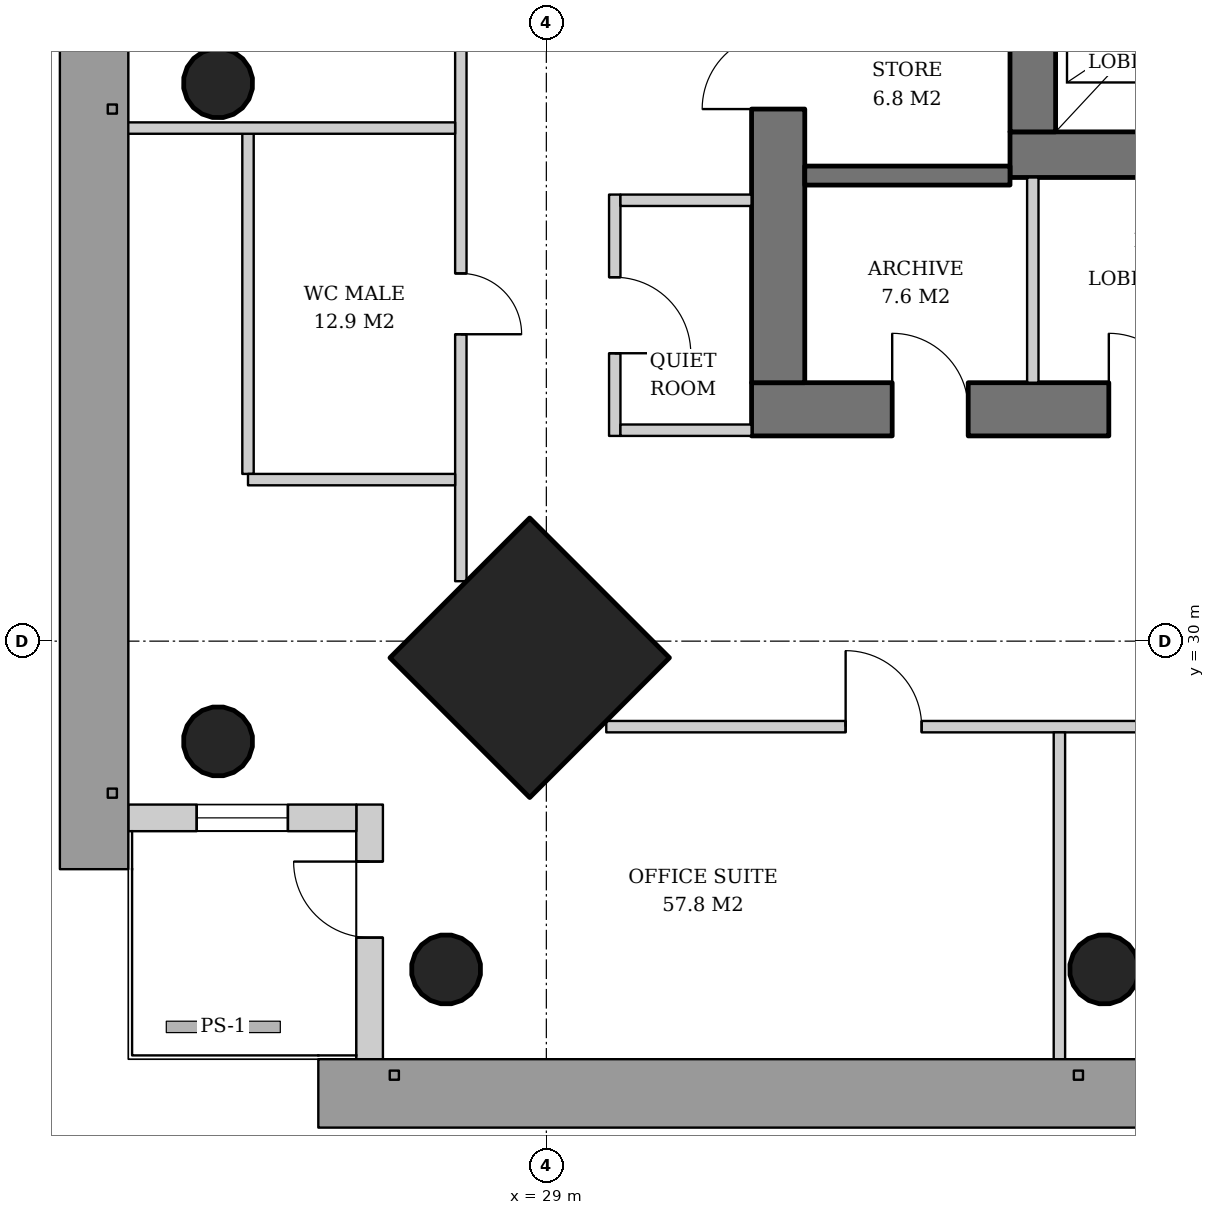
"""IFC4 building model, lengths in metres.
Left out: names, types, materials, properties, quantities, classifications, styles, units other than length and angle.
Written with IfcOpenShell. Run it as: python <this file> out.ifc"""

import sys

from ifc_helpers import new_model, si_unit, direction, frame, frame_2d, origin, origin_2d, place, context, subcontext, project, spatial, rectangle, hollow_circle, extrude, element, fill, save


model = new_model("IFC4")
c1 = context("Model", 3, precision=1e-05, world=origin(), true_north=direction((0.0, 1.0)))
c2 = subcontext(c1, "Body", "Model", "MODEL_VIEW")
j1 = project(units=[si_unit("LENGTHUNIT", "METRE"), si_unit("PLANEANGLEUNIT", "RADIAN")], contexts=[c1])
p1 = place(None, origin())
s1 = spatial("IfcSite", under=j1, at=p1, CompositionType="ELEMENT")
p2 = place(p1, origin())
s2 = spatial("IfcBuilding", under=s1, at=p2, CompositionType="ELEMENT")
p3 = place(p2, frame((0.0, 0.0, 135.0)))
s3 = spatial("IfcBuildingStorey", under=s2, at=p3, CompositionType="ELEMENT", Elevation=135.0)
p4 = place(p3, frame((28.743, 29.743, 0.0), z_axis=(0.031898107953, 0.031898107953, 0.998981992539), x_axis=(-0.707106781187, 0.707106781187, 0.0)))
e1 = element("IfcColumn", 1, at=p4, inside=s3, PredefinedType="COLUMN", context=c2, shape_type="SweptSolid", body=[
    extrude(rectangle(XDim=2.6, YDim=2.6, at=origin_2d()), origin(), (0.0, 0.0, 1.0), 3.804),
])
p5 = place(p3, frame((24.643, 28.643, 0.0), z_axis=(0.031962158256, 0.031962158256, 0.998977898093), x_axis=(-0.707106781187, 0.707106781187, 0.0)))
e2 = element("IfcColumn", 2, at=p5, inside=s3, PredefinedType="COLUMN", context=c2, shape_type="SweptSolid", body=[
    extrude(hollow_circle(Radius=0.457, WallThickness=0.03, at=origin_2d()), origin(), (0.0, 0.0, 1.0), 3.804),
])
p6 = place(p3, frame((24.643, 37.322, 0.0), z_axis=(0.031974442509, 0.015923015547, 0.999361842679), x_axis=(-0.445775033553, 0.895145027055, 0.0)))
e3 = element("IfcColumn", 3, at=p6, inside=s3, PredefinedType="COLUMN", context=c2, shape_type="SweptSolid", body=[
    extrude(hollow_circle(Radius=0.457, WallThickness=0.03, at=origin_2d()), origin(), (0.0, 0.0, 1.0), 3.802),
])
p7 = place(p3, frame((27.643, 25.643, 0.0), z_axis=(0.031962158256, 0.031962158256, 0.998977898093), x_axis=(-0.707106781187, 0.707106781187, 0.0)))
e4 = element("IfcColumn", 4, at=p7, inside=s3, PredefinedType="COLUMN", context=c2, shape_type="SweptSolid", body=[
    extrude(hollow_circle(Radius=0.457, WallThickness=0.03, at=origin_2d()), origin(), (0.0, 0.0, 1.0), 3.804),
])
p8 = place(p3, frame((36.322, 25.643, 0.0), z_axis=(0.015923015547, 0.031974442509, 0.999361842679), x_axis=(-0.895145027055, 0.445775033553, 0.0)))
e5 = element("IfcColumn", 5, at=p8, inside=s3, PredefinedType="COLUMN", context=c2, shape_type="SweptSolid", body=[
    extrude(hollow_circle(Radius=0.457, WallThickness=0.03, at=origin_2d()), origin(), (0.0, 0.0, 1.0), 3.802),
])
p9 = place(p3, frame((35.1, 36.4, 0.0), z_axis=(0.0, 0.0, 1.0), x_axis=(1.0, 0.0, 0.0)))
e6 = element("IfcWall", 6, at=p9, inside=s3, PredefinedType="SHEAR", context=c2, shape_type="SweptSolid", body=[
    extrude(rectangle(XDim=19.8, YDim=0.6, at=frame_2d((9.9, 0.0))), origin(), (0.0, 0.0, 1.0), 3.8),
])
p10 = place(p9, frame((3.9, 0.0, 0.0)))
e7 = element("IfcOpeningElement", 7, at=p10, cuts=e6, PredefinedType="OPENING", context=c2, shape_type="SweptSolid", body=[
    extrude(rectangle(XDim=1.0, YDim=2.1, at=frame_2d((0.5, 1.05))), frame((0.0, 0.31, 0.0), z_axis=(0.0, -1.0, 0.0), x_axis=(1.0, 0.0, 0.0)), (0.0, 0.0, 1.0), 0.62),
])
p11 = place(p9, frame((15.35, 0.0, 0.0)))
e8 = element("IfcOpeningElement", 8, at=p11, cuts=e6, PredefinedType="OPENING", context=c2, shape_type="SweptSolid", body=[
    extrude(rectangle(XDim=1.0, YDim=2.1, at=frame_2d((0.5, 1.05))), frame((0.0, 0.31, 0.0), z_axis=(0.0, -1.0, 0.0), x_axis=(1.0, 0.0, 0.0)), (0.0, 0.0, 1.0), 0.62),
])
p12 = place(p3, frame((35.4, 36.7, 0.0), z_axis=(0.0, 0.0, 1.0), x_axis=(0.0, 1.0, 0.0)))
e9 = element("IfcWall", 9, at=p12, inside=s3, PredefinedType="SHEAR", context=c2, shape_type="SweptSolid", body=[
    extrude(rectangle(XDim=18.6, YDim=0.6, at=frame_2d((9.3, 0.0))), origin(), (0.0, 0.0, 1.0), 3.8),
])
p13 = place(p12, frame((8.4, 0.0, 0.0)))
e10 = element("IfcOpeningElement", 10, at=p13, cuts=e9, PredefinedType="OPENING", context=c2, shape_type="SweptSolid", body=[
    extrude(rectangle(XDim=1.8, YDim=2.4, at=frame_2d((0.9, 1.2))), frame((0.0, 0.31, 0.0), z_axis=(0.0, -1.0, 0.0), x_axis=(1.0, 0.0, 0.0)), (0.0, 0.0, 1.0), 0.62),
])
p14 = place(p3, frame((31.7, 33.05, 0.0), z_axis=(0.0, 0.0, 1.0), x_axis=(1.0, 0.0, 0.0)))
e11 = element("IfcWall", 11, at=p14, inside=s3, PredefinedType="SHEAR", context=c2, shape_type="SweptSolid", body=[
    extrude(rectangle(XDim=26.6, YDim=0.7, at=frame_2d((13.3, 0.0))), origin(), (0.0, 0.0, 1.0), 3.8),
])
p15 = place(p14, frame((7.3, 0.0, 0.0)))
e12 = element("IfcOpeningElement", 12, at=p15, cuts=e11, PredefinedType="OPENING", context=c2, shape_type="SweptSolid", body=[
    extrude(rectangle(XDim=1.0, YDim=2.1, at=frame_2d((0.5, 1.05))), frame((0.0, 0.36, 0.0), z_axis=(0.0, -1.0, 0.0), x_axis=(1.0, 0.0, 0.0)), (0.0, 0.0, 1.0), 0.72),
])
p16 = place(p14, frame((18.75, 0.0, 0.0)))
e13 = element("IfcOpeningElement", 13, at=p16, cuts=e11, PredefinedType="OPENING", context=c2, shape_type="SweptSolid", body=[
    extrude(rectangle(XDim=1.0, YDim=2.1, at=frame_2d((0.5, 1.05))), frame((0.0, 0.36, 0.0), z_axis=(0.0, -1.0, 0.0), x_axis=(1.0, 0.0, 0.0)), (0.0, 0.0, 1.0), 0.72),
])
p17 = place(p14, frame((1.85, 0.0, 0.0)))
e14 = element("IfcOpeningElement", 14, at=p17, cuts=e11, PredefinedType="OPENING", context=c2, shape_type="SweptSolid", body=[
    extrude(rectangle(XDim=1.0, YDim=2.1, at=frame_2d((0.5, 1.05))), frame((0.0, 0.36, 0.0), z_axis=(0.0, -1.0, 0.0), x_axis=(1.0, 0.0, 0.0)), (0.0, 0.0, 1.0), 0.72),
])
p18 = place(p14, frame((4.7, 0.0, 0.0)))
e15 = element("IfcOpeningElement", 15, at=p18, cuts=e11, PredefinedType="OPENING", context=c2, shape_type="SweptSolid", body=[
    extrude(rectangle(XDim=1.0, YDim=2.1, at=frame_2d((0.5, 1.05))), frame((0.0, 0.36, 0.0), z_axis=(0.0, -1.0, 0.0), x_axis=(1.0, 0.0, 0.0)), (0.0, 0.0, 1.0), 0.72),
])
p19 = place(p14, frame((12.44, 0.0, 0.0)))
e16 = element("IfcOpeningElement", 16, at=p19, cuts=e11, PredefinedType="OPENING", context=c2, shape_type="SweptSolid", body=[
    extrude(rectangle(XDim=1.0, YDim=2.1, at=frame_2d((0.5, 1.05))), frame((0.0, 0.36, 0.0), z_axis=(0.0, -1.0, 0.0), x_axis=(1.0, 0.0, 0.0)), (0.0, 0.0, 1.0), 0.72),
])
p20 = place(p14, frame((20.644, 0.0, 0.0)))
e17 = element("IfcOpeningElement", 17, at=p20, cuts=e11, PredefinedType="OPENING", context=c2, shape_type="SweptSolid", body=[
    extrude(rectangle(XDim=1.0, YDim=2.1, at=frame_2d((0.5, 1.05))), frame((0.0, 0.36, 0.0), z_axis=(0.0, -1.0, 0.0), x_axis=(1.0, 0.0, 0.0)), (0.0, 0.0, 1.0), 0.72),
])
p21 = place(p14, frame((23.544, 0.0, 0.0)))
e18 = element("IfcOpeningElement", 18, at=p21, cuts=e11, PredefinedType="OPENING", context=c2, shape_type="SweptSolid", body=[
    extrude(rectangle(XDim=1.0, YDim=2.1, at=frame_2d((0.5, 1.05))), frame((0.0, 0.36, 0.0), z_axis=(0.0, -1.0, 0.0), x_axis=(1.0, 0.0, 0.0)), (0.0, 0.0, 1.0), 0.72),
])
p22 = place(p3, frame((32.05, 33.4, 0.0), z_axis=(0.0, 0.0, 1.0), x_axis=(0.0, 1.0, 0.0)))
e19 = element("IfcWall", 19, at=p22, inside=s3, PredefinedType="SHEAR", context=c2, shape_type="SweptSolid", body=[
    extrude(rectangle(XDim=25.2, YDim=0.7, at=frame_2d((12.6, 0.0))), origin(), (0.0, 0.0, 1.0), 3.8),
])
p23 = place(p22, frame((11.7, 0.0, 0.0)))
e20 = element("IfcOpeningElement", 20, at=p23, cuts=e19, PredefinedType="OPENING", context=c2, shape_type="SweptSolid", body=[
    extrude(rectangle(XDim=1.8, YDim=2.4, at=frame_2d((0.9, 1.2))), frame((0.0, 0.36, 0.0), z_axis=(0.0, -1.0, 0.0), x_axis=(1.0, 0.0, 0.0)), (0.0, 0.0, 1.0), 0.72),
])
p24 = place(p22, frame((3.6, 0.0, 0.0)))
e21 = element("IfcOpeningElement", 21, at=p24, cuts=e19, PredefinedType="OPENING", context=c2, shape_type="SweptSolid", body=[
    extrude(rectangle(XDim=1.0, YDim=2.1, at=frame_2d((0.5, 1.05))), frame((0.0, 0.36, 0.0), z_axis=(0.0, -1.0, 0.0), x_axis=(1.0, 0.0, 0.0)), (0.0, 0.0, 1.0), 0.72),
])
p25 = place(p22, frame((6.35, 0.0, 0.0)))
e22 = element("IfcOpeningElement", 22, at=p25, cuts=e19, PredefinedType="OPENING", context=c2, shape_type="SweptSolid", body=[
    extrude(rectangle(XDim=1.0, YDim=2.1, at=frame_2d((0.5, 1.05))), frame((0.0, 0.36, 0.0), z_axis=(0.0, -1.0, 0.0), x_axis=(1.0, 0.0, 0.0)), (0.0, 0.0, 1.0), 0.72),
])
p26 = place(p22, frame((9.1, 0.0, 0.0)))
e23 = element("IfcOpeningElement", 23, at=p26, cuts=e19, PredefinedType="OPENING", context=c2, shape_type="SweptSolid", body=[
    extrude(rectangle(XDim=1.0, YDim=2.1, at=frame_2d((0.5, 1.05))), frame((0.0, 0.36, 0.0), z_axis=(0.0, -1.0, 0.0), x_axis=(1.0, 0.0, 0.0)), (0.0, 0.0, 1.0), 0.72),
])
p27 = place(p22, frame((15.1, 0.0, 0.0)))
e24 = element("IfcOpeningElement", 24, at=p27, cuts=e19, PredefinedType="OPENING", context=c2, shape_type="SweptSolid", body=[
    extrude(rectangle(XDim=1.0, YDim=2.1, at=frame_2d((0.5, 1.05))), frame((0.0, 0.36, 0.0), z_axis=(0.0, -1.0, 0.0), x_axis=(1.0, 0.0, 0.0)), (0.0, 0.0, 1.0), 0.72),
])
p28 = place(p22, frame((17.85, 0.0, 0.0)))
e25 = element("IfcOpeningElement", 25, at=p28, cuts=e19, PredefinedType="OPENING", context=c2, shape_type="SweptSolid", body=[
    extrude(rectangle(XDim=1.0, YDim=2.1, at=frame_2d((0.5, 1.05))), frame((0.0, 0.36, 0.0), z_axis=(0.0, -1.0, 0.0), x_axis=(1.0, 0.0, 0.0)), (0.0, 0.0, 1.0), 0.72),
])
p29 = place(p3, frame((26.675, 24.5, 0.0), z_axis=(0.0, 0.0, 1.0), x_axis=(0.0, 1.0, 0.0)))
e26 = element("IfcWall", 26, at=p29, inside=s3, PredefinedType="SOLIDWALL", context=c2, shape_type="SweptSolid", body=[
    extrude(rectangle(XDim=3.35, YDim=0.35, at=frame_2d((1.675, 0.0))), origin(), (0.0, 0.0, 1.0), 3.62),
])
p30 = place(p29, frame((1.6, 0.0, 0.0)))
e27 = element("IfcOpeningElement", 27, at=p30, cuts=e26, PredefinedType="OPENING", context=c2, shape_type="SweptSolid", body=[
    extrude(rectangle(XDim=1.0, YDim=2.4, at=frame_2d((0.5, 1.2))), frame((0.0, 0.185, 0.0), z_axis=(0.0, -1.0, 0.0), x_axis=(1.0, 0.0, 0.0)), (0.0, 0.0, 1.0), 0.37),
])
p31 = place(p3, frame((26.5, 27.675, 0.0), z_axis=(0.0, 0.0, 1.0), x_axis=(-1.0, 0.0, 0.0)))
e28 = element("IfcWall", 28, at=p31, inside=s3, PredefinedType="SOLIDWALL", context=c2, shape_type="SweptSolid", body=[
    extrude(rectangle(XDim=3.0, YDim=0.35, at=frame_2d((1.5, 0.0))), origin(), (0.0, 0.0, 1.0), 3.62),
])
p32 = place(p31, frame((0.9, 0.0, 0.6)))
e29 = element("IfcOpeningElement", 29, at=p32, cuts=e28, PredefinedType="OPENING", context=c2, shape_type="SweptSolid", body=[
    extrude(rectangle(XDim=1.2, YDim=2.55, at=frame_2d((0.6, 1.275))), frame((0.0, 0.185, 0.0), z_axis=(0.0, -1.0, 0.0), x_axis=(1.0, 0.0, 0.0)), (0.0, 0.0, 1.0), 0.37),
])
p33 = place(p3, frame((32.4, 36.125, 0.0), z_axis=(0.0, 0.0, 1.0), x_axis=(1.0, 0.0, 0.0)))
e30 = element("IfcWall", 30, at=p33, inside=s3, PredefinedType="SHEAR", context=c2, shape_type="SweptSolid", body=[
    extrude(rectangle(XDim=2.7, YDim=0.25, at=frame_2d((1.35, 0.0))), origin(), (0.0, 0.0, 1.0), 3.8),
])
p34 = place(p3, frame((35.4, 33.4, 0.0), z_axis=(0.0, 0.0, 1.0), x_axis=(0.0, 1.0, 0.0)))
e31 = element("IfcWall", 31, at=p34, inside=s3, PredefinedType="SOLIDWALL", context=c2, shape_type="SweptSolid", body=[
    extrude(rectangle(XDim=2.7, YDim=0.15, at=frame_2d((1.35, 0.0))), origin(), (0.0, 0.0, 1.0), 3.62),
])
p35 = place(p3, frame((29.9, 35.875, 0.0), z_axis=(0.0, 0.0, 1.0), x_axis=(0.0, -1.0, 0.0)))
e32 = element("IfcWall", 32, at=p35, inside=s3, PredefinedType="PARTITIONING", context=c2, shape_type="SweptSolid", body=[
    extrude(rectangle(XDim=3.175, YDim=0.15, at=frame_2d((1.587, 0.0))), origin(), (0.0, 0.0, 1.0), 2.806),
])
p36 = place(p35, frame((1.087, 0.0, 0.0)))
e33 = element("IfcOpeningElement", 33, at=p36, cuts=e32, PredefinedType="OPENING", context=c2, shape_type="SweptSolid", body=[
    extrude(rectangle(XDim=1.0, YDim=2.1, at=frame_2d((0.5, 1.05))), frame((0.0, 0.085, 0.0), z_axis=(0.0, -1.0, 0.0), x_axis=(1.0, 0.0, 0.0)), (0.0, 0.0, 1.0), 0.17),
])
for number, where, z_axis, x_axis in (
    (34, (31.7, 35.8, 0.0), (0.0, 0.0, 1.0), (-1.0, 0.0, 0.0)),
    (35, (31.7, 32.775, 0.0), (0.0, 0.0, 1.0), (-1.0, 0.0, 0.0)),
):
    element("IfcWall", number, at=place(p3, frame(where, z_axis=z_axis, x_axis=x_axis)), inside=s3, PredefinedType="PARTITIONING", context=c2, shape_type="SweptSolid", body=[
        extrude(rectangle(XDim=1.725, YDim=0.15, at=frame_2d((0.862, 0.0))), origin(), (0.0, 0.0, 1.0), 3.62),
    ])
p37 = place(p3, frame((25.075, 36.815, 0.0), z_axis=(0.0, 0.0, 1.0), x_axis=(0.0, -1.0, 0.0)))
e36 = element("IfcWall", 36, at=p37, inside=s3, PredefinedType="PARTITIONING", context=c2, shape_type="SweptSolid", body=[
    extrude(rectangle(XDim=4.615, YDim=0.15, at=frame_2d((2.308, 0.0))), origin(), (0.0, 0.0, 1.0), 2.806),
])
p38 = place(p3, frame((27.875, 61.211, 0.0), z_axis=(0.0, 0.0, 1.0), x_axis=(0.0, -1.0, 0.0)))
e37 = element("IfcWall", 37, at=p38, inside=s3, PredefinedType="PARTITIONING", context=c2, shape_type="SweptSolid", body=[
    extrude(rectangle(XDim=30.423, YDim=0.15, at=frame_2d((15.211, 0.0))), origin(), (0.0, 0.0, 1.0), 2.72),
])
p39 = place(p38, frame((3.149, 0.0, 0.0)))
e38 = element("IfcOpeningElement", 38, at=p39, cuts=e37, PredefinedType="OPENING", context=c2, shape_type="SweptSolid", body=[
    extrude(rectangle(XDim=1.0, YDim=2.1, at=frame_2d((0.5, 1.05))), frame((0.0, 0.085, 0.0), z_axis=(0.0, -1.0, 0.0), x_axis=(1.0, 0.0, 0.0)), (0.0, 0.0, 1.0), 0.17),
])
p40 = place(p38, frame((7.774, 0.0, 0.0)))
e39 = element("IfcOpeningElement", 39, at=p40, cuts=e37, PredefinedType="OPENING", context=c2, shape_type="SweptSolid", body=[
    extrude(rectangle(XDim=1.0, YDim=2.1, at=frame_2d((0.5, 1.05))), frame((0.0, 0.085, 0.0), z_axis=(0.0, -1.0, 0.0), x_axis=(1.0, 0.0, 0.0)), (0.0, 0.0, 1.0), 0.17),
])
p41 = place(p38, frame((12.399, 0.0, 0.0)))
e40 = element("IfcOpeningElement", 40, at=p41, cuts=e37, PredefinedType="OPENING", context=c2, shape_type="SweptSolid", body=[
    extrude(rectangle(XDim=1.0, YDim=2.1, at=frame_2d((0.5, 1.05))), frame((0.0, 0.085, 0.0), z_axis=(0.0, -1.0, 0.0), x_axis=(1.0, 0.0, 0.0)), (0.0, 0.0, 1.0), 0.17),
])
p42 = place(p38, frame((17.124, 0.0, 0.0)))
e41 = element("IfcOpeningElement", 41, at=p42, cuts=e37, PredefinedType="OPENING", context=c2, shape_type="SweptSolid", body=[
    extrude(rectangle(XDim=0.8, YDim=2.1, at=frame_2d((0.4, 1.05))), frame((0.0, 0.085, 0.0), z_axis=(0.0, -1.0, 0.0), x_axis=(1.0, 0.0, 0.0)), (0.0, 0.0, 1.0), 0.17),
])
p43 = place(p38, frame((21.649, 0.0, 0.0)))
e42 = element("IfcOpeningElement", 42, at=p43, cuts=e37, PredefinedType="OPENING", context=c2, shape_type="SweptSolid", body=[
    extrude(rectangle(XDim=1.0, YDim=2.1, at=frame_2d((0.5, 1.05))), frame((0.0, 0.085, 0.0), z_axis=(0.0, -1.0, 0.0), x_axis=(1.0, 0.0, 0.0)), (0.0, 0.0, 1.0), 0.17),
])
p44 = place(p38, frame((26.374, 0.0, 0.0)))
e43 = element("IfcOpeningElement", 43, at=p44, cuts=e37, PredefinedType="OPENING", context=c2, shape_type="SweptSolid", body=[
    extrude(rectangle(XDim=0.8, YDim=2.1, at=frame_2d((0.4, 1.05))), frame((0.0, 0.085, 0.0), z_axis=(0.0, -1.0, 0.0), x_axis=(1.0, 0.0, 0.0)), (0.0, 0.0, 1.0), 0.17),
])
p45 = place(p3, frame((27.8, 36.75, 0.0), z_axis=(0.0, 0.0, 1.0), x_axis=(-1.0, 0.0, 0.0)))
e44 = element("IfcWall", 44, at=p45, inside=s3, PredefinedType="PARTITIONING", context=c2, shape_type="SweptSolid", body=[
    extrude(rectangle(XDim=4.34, YDim=0.15, at=frame_2d((2.17, 0.0))), origin(), (0.0, 0.0, 1.0), 2.82),
])
p46 = place(p3, frame((27.8, 32.125, 0.0), z_axis=(0.0, 0.0, 1.0), x_axis=(-1.0, 0.0, 0.0)))
e45 = element("IfcWall", 45, at=p46, inside=s3, PredefinedType="PARTITIONING", context=c2, shape_type="SweptSolid", body=[
    extrude(rectangle(XDim=2.725, YDim=0.15, at=frame_2d((1.363, 0.0))), origin(), (0.0, 0.0, 1.0), 3.62),
])
p47 = place(p3, frame((29.789, 28.875, 0.0), z_axis=(0.0, 0.0, 1.0), x_axis=(1.0, 0.0, 0.0)))
e46 = element("IfcWall", 46, at=p47, inside=s3, PredefinedType="PARTITIONING", context=c2, shape_type="SweptSolid", body=[
    extrude(rectangle(XDim=30.423, YDim=0.15, at=frame_2d((15.211, 0.0))), origin(), (0.0, 0.0, 1.0), 2.72),
])
p48 = place(p47, frame((3.149, 0.0, 0.0)))
e47 = element("IfcOpeningElement", 47, at=p48, cuts=e46, PredefinedType="OPENING", context=c2, shape_type="SweptSolid", body=[
    extrude(rectangle(XDim=1.0, YDim=2.1, at=frame_2d((0.5, 1.05))), frame((0.0, 0.085, 0.0), z_axis=(0.0, -1.0, 0.0), x_axis=(1.0, 0.0, 0.0)), (0.0, 0.0, 1.0), 0.17),
])
p49 = place(p47, frame((7.774, 0.0, 0.0)))
e48 = element("IfcOpeningElement", 48, at=p49, cuts=e46, PredefinedType="OPENING", context=c2, shape_type="SweptSolid", body=[
    extrude(rectangle(XDim=1.0, YDim=2.1, at=frame_2d((0.5, 1.05))), frame((0.0, 0.085, 0.0), z_axis=(0.0, -1.0, 0.0), x_axis=(1.0, 0.0, 0.0)), (0.0, 0.0, 1.0), 0.17),
])
p50 = place(p47, frame((12.399, 0.0, 0.0)))
e49 = element("IfcOpeningElement", 49, at=p50, cuts=e46, PredefinedType="OPENING", context=c2, shape_type="SweptSolid", body=[
    extrude(rectangle(XDim=1.0, YDim=2.1, at=frame_2d((0.5, 1.05))), frame((0.0, 0.085, 0.0), z_axis=(0.0, -1.0, 0.0), x_axis=(1.0, 0.0, 0.0)), (0.0, 0.0, 1.0), 0.17),
])
p51 = place(p47, frame((21.649, 0.0, 0.0)))
e50 = element("IfcOpeningElement", 50, at=p51, cuts=e46, PredefinedType="OPENING", context=c2, shape_type="SweptSolid", body=[
    extrude(rectangle(XDim=1.0, YDim=2.1, at=frame_2d((0.5, 1.05))), frame((0.0, 0.085, 0.0), z_axis=(0.0, -1.0, 0.0), x_axis=(1.0, 0.0, 0.0)), (0.0, 0.0, 1.0), 0.17),
])
p52 = place(p3, frame((35.75, 28.8, 0.0), z_axis=(0.0, 0.0, 1.0), x_axis=(0.0, -1.0, 0.0)))
e51 = element("IfcWall", 51, at=p52, inside=s3, PredefinedType="PARTITIONING", context=c2, shape_type="SweptSolid", body=[
    extrude(rectangle(XDim=4.34, YDim=0.15, at=frame_2d((2.17, 0.0))), origin(), (0.0, 0.0, 1.0), 2.82),
])
p53 = place(p30, origin())
e52 = element("IfcDoor", 52, at=p53, inside=s3, OperationType="SINGLE_SWING_RIGHT", PredefinedType="DOOR", context=c2, shape_type="SweptSolid", body=[
    extrude(rectangle(XDim=1.0, YDim=2.4, at=frame_2d((0.5, 1.2))), frame((0.0, 0.025, 0.0), z_axis=(0.0, -1.0, 0.0), x_axis=(1.0, 0.0, 0.0)), (0.0, 0.0, 1.0), 0.05),
])
fill(e27, e52)
p54 = place(p32, origin())
e53 = element("IfcWindow", 53, at=p54, inside=s3, PartitioningType="SINGLE_PANEL", PredefinedType="WINDOW", context=c2, shape_type="SweptSolid", body=[
    extrude(rectangle(XDim=1.2, YDim=2.55, at=frame_2d((0.6, 1.275))), frame((0.0, 0.03, 0.0), z_axis=(0.0, -1.0, 0.0), x_axis=(1.0, 0.0, 0.0)), (0.0, 0.0, 1.0), 0.06),
])
fill(e29, e53)
p55 = place(p24, origin())
e54 = element("IfcDoor", 54, at=p55, inside=s3, OperationType="SINGLE_SWING_LEFT", PredefinedType="DOOR", context=c2, shape_type="SweptSolid", body=[
    extrude(rectangle(XDim=1.0, YDim=2.1, at=frame_2d((0.5, 1.05))), frame((0.0, -0.29, 0.0), z_axis=(0.0, -1.0, 0.0), x_axis=(1.0, 0.0, 0.0)), (0.0, 0.0, 1.0), 0.05),
])
fill(e21, e54)
p56 = place(p17, origin())
e55 = element("IfcDoor", 55, at=p56, inside=s3, OperationType="SINGLE_SWING_LEFT", PredefinedType="DOOR", context=c2, shape_type="SweptSolid", body=[
    extrude(rectangle(XDim=1.0, YDim=2.1, at=frame_2d((0.5, 1.05))), frame((0.0, 0.34, 0.0), z_axis=(0.0, -1.0, 0.0), x_axis=(1.0, 0.0, 0.0)), (0.0, 0.0, 1.0), 0.05),
])
fill(e14, e55)
p57 = place(p18, origin())
e56 = element("IfcDoor", 56, at=p57, inside=s3, OperationType="SINGLE_SWING_LEFT", PredefinedType="DOOR", context=c2, shape_type="SweptSolid", body=[
    extrude(rectangle(XDim=1.0, YDim=2.1, at=frame_2d((0.5, 1.05))), frame((0.0, 0.34, 0.0), z_axis=(0.0, -1.0, 0.0), x_axis=(1.0, 0.0, 0.0)), (0.0, 0.0, 1.0), 0.05),
])
fill(e15, e56)
p58 = place(p36, origin())
e57 = element("IfcDoor", 57, at=p58, inside=s3, OperationType="SINGLE_SWING_RIGHT", PredefinedType="DOOR", context=c2, shape_type="SweptSolid", body=[
    extrude(rectangle(XDim=1.0, YDim=2.1, at=frame_2d((0.5, 1.05))), frame((0.0, 0.025, 0.0), z_axis=(0.0, -1.0, 0.0), x_axis=(1.0, 0.0, 0.0)), (0.0, 0.0, 1.0), 0.05),
])
fill(e33, e57)
p59 = place(p44, origin())
e58 = element("IfcDoor", 58, at=p59, inside=s3, OperationType="SINGLE_SWING_RIGHT", PredefinedType="DOOR", context=c2, shape_type="SweptSolid", body=[
    extrude(rectangle(XDim=0.8, YDim=2.1, at=frame_2d((0.4, 1.05))), frame((0.0, 0.025, 0.0), z_axis=(0.0, -1.0, 0.0), x_axis=(1.0, 0.0, 0.0)), (0.0, 0.0, 1.0), 0.05),
])
fill(e43, e58)
p60 = place(p48, origin())
e59 = element("IfcDoor", 59, at=p60, inside=s3, OperationType="SINGLE_SWING_LEFT", PredefinedType="DOOR", context=c2, shape_type="SweptSolid", body=[
    extrude(rectangle(XDim=1.0, YDim=2.1, at=frame_2d((0.5, 1.05))), frame((0.0, 0.025, 0.0), z_axis=(0.0, -1.0, 0.0), x_axis=(1.0, 0.0, 0.0)), (0.0, 0.0, 1.0), 0.05),
])
fill(e47, e59)
save(model, sys.argv[1])
